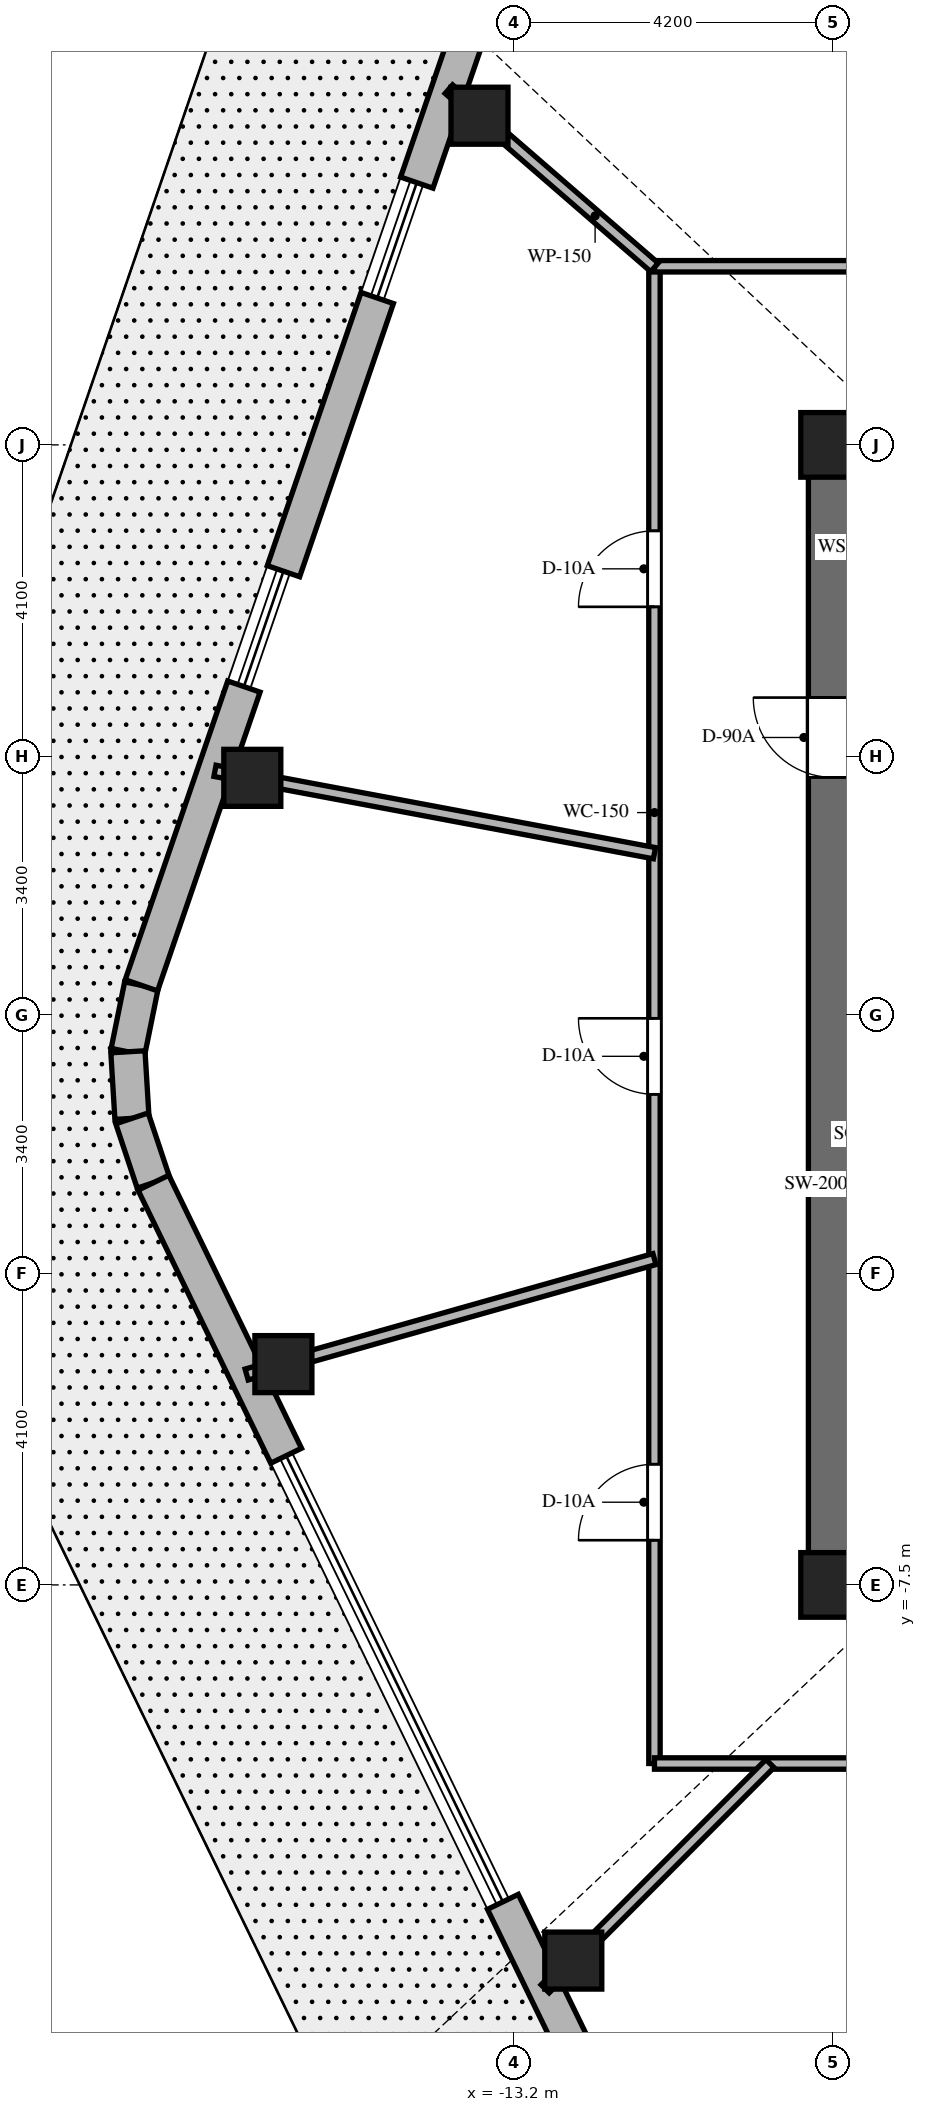
"""IFC4 building model, lengths in metres.
Left out: names, types, materials, properties, quantities, classifications, styles, units other than length and angle.
Written with IfcOpenShell. Run it as: python <this file> out.ifc"""

import sys

from ifc_helpers import new_model, si_unit, direction, frame, frame_2d, origin, origin_2d, place, context, subcontext, project, spatial, rectangle, extrude, element, fill, save


model = new_model("IFC4")
c1 = context("Model", 3, precision=1e-05, world=origin(), true_north=direction((0.0, 1.0)))
c2 = subcontext(c1, "Body", "Model", "MODEL_VIEW")
j1 = project(units=[si_unit("LENGTHUNIT", "METRE"), si_unit("PLANEANGLEUNIT", "RADIAN")], contexts=[c1])
p1 = place(None, origin())
s1 = spatial("IfcSite", under=j1, at=p1, CompositionType="ELEMENT")
p2 = place(p1, origin())
s2 = spatial("IfcBuilding", under=s1, at=p2, CompositionType="ELEMENT")
p3 = place(p2, frame((0.0, 0.0, 305.4)))
s3 = spatial("IfcBuildingStorey", under=s2, at=p3, CompositionType="ELEMENT", Elevation=305.4)
p4 = place(p3, frame((-9.325, -7.5, 0.0), z_axis=(0.0, 0.0, 1.0), x_axis=(1.0, 0.0, 0.0)))
e1 = element("IfcWall", 1, at=p4, inside=s3, PredefinedType="SHEAR", context=c2, shape_type="SweptSolid", body=[
    extrude(rectangle(XDim=18.65, YDim=0.65, at=frame_2d((9.325, 0.0))), origin(), (0.0, 0.0, 1.0), 5.0),
])
p5 = place(p4, frame((9.375, 0.0, 0.0)))
e2 = element("IfcOpeningElement", 2, at=p5, cuts=e1, PredefinedType="OPENING", context=c2, shape_type="SweptSolid", body=[
    extrude(rectangle(XDim=1.0, YDim=2.15, at=frame_2d((0.5, 1.075))), frame((0.0, 0.335, 0.0), z_axis=(0.0, -1.0, 0.0), x_axis=(1.0, 0.0, 0.0)), (0.0, 0.0, 1.0), 0.67),
])
p6 = place(p3, frame((-9.325, 7.5, 0.0), z_axis=(0.0, 0.0, 1.0), x_axis=(1.0, 0.0, 0.0)))
e3 = element("IfcWall", 3, at=p6, inside=s3, PredefinedType="SHEAR", context=c2, shape_type="SweptSolid", body=[
    extrude(rectangle(XDim=9.375, YDim=0.65, at=frame_2d((4.688, 0.0))), origin(), (0.0, 0.0, 1.0), 5.0),
])
p7 = place(p3, frame((-9.0, -7.175, 0.0), z_axis=(0.0, 0.0, 1.0), x_axis=(0.0, 1.0, 0.0)))
e4 = element("IfcWall", 4, at=p7, inside=s3, PredefinedType="SHEAR", context=c2, shape_type="SweptSolid", body=[
    extrude(rectangle(XDim=14.35, YDim=0.65, at=frame_2d((7.175, 0.0))), origin(), (0.0, 0.0, 1.0), 5.0),
])
p8 = place(p7, frame((10.3, 0.0, 0.0)))
e5 = element("IfcOpeningElement", 5, at=p8, cuts=e4, PredefinedType="OPENING", context=c2, shape_type="SweptSolid", body=[
    extrude(rectangle(XDim=1.05, YDim=2.15, at=frame_2d((0.525, 1.075))), frame((0.0, 0.335, 0.0), z_axis=(0.0, -1.0, 0.0), x_axis=(1.0, 0.0, 0.0)), (0.0, 0.0, 1.0), 0.67),
])
for number, where, z_axis, x_axis in (
    (6, (-9.0, -7.5, 0.0), (0.0, 0.0, 1.0), (1.0, 0.0, 0.0)),
    (7, (-9.0, 7.5, 0.0), (0.0, 0.0, 1.0), (1.0, 0.0, 0.0)),
):
    element("IfcColumn", number, at=place(p3, frame(where, z_axis=z_axis, x_axis=x_axis)), inside=s3, PredefinedType="COLUMN", context=c2, shape_type="SweptSolid", body=[
        extrude(rectangle(XDim=0.85, YDim=0.85, at=origin_2d()), origin(), (0.0, 0.0, 1.0), 5.0),
    ])
for number, where, z_axis, x_axis in (
    (8, (-13.652, 11.831, 0.0), (0.0, 0.0, 1.0), (1.0, 0.0, 0.0)),
    (9, (-16.641, 3.119, 0.0), (0.0, 0.0, 1.0), (1.0, 0.0, 0.0)),
    (10, (-16.232, -4.595, 0.0), (0.0, 0.0, 1.0), (1.0, 0.0, 0.0)),
    (11, (-12.418, -12.443, 0.0), (0.0, 0.0, 1.0), (1.0, 0.0, 0.0)),
):
    element("IfcColumn", number, at=place(p3, frame(where, z_axis=z_axis, x_axis=x_axis)), inside=s3, PredefinedType="COLUMN", context=c2, shape_type="SweptSolid", body=[
        extrude(rectangle(XDim=0.75, YDim=0.75, at=origin_2d()), origin(), (0.0, 0.0, 1.0), 5.0),
    ])
p9 = place(p3, frame((-18.1, 0.389, 0.0), z_axis=(0.0, 0.0, 1.0), x_axis=(-0.198587865476, -0.980083088154, 0.0)))
e12 = element("IfcWall", 12, at=p9, inside=s3, PredefinedType="SOLIDWALL", context=c2, shape_type="SweptSolid", body=[
    extrude(rectangle(XDim=0.893, YDim=0.45, at=frame_2d((0.446, 0.0))), origin(), (0.0, 0.0, 1.0), 4.68),
])
p10 = place(p3, frame((-18.278, -0.486, 0.0), z_axis=(0.0, 0.0, 1.0), x_axis=(0.060923410031, -0.998142443798, 0.0)))
e13 = element("IfcWall", 13, at=p10, inside=s3, PredefinedType="SOLIDWALL", context=c2, shape_type="SweptSolid", body=[
    extrude(rectangle(XDim=0.878, YDim=0.45, at=frame_2d((0.439, 0.0))), origin(), (0.0, 0.0, 1.0), 4.68),
])
p11 = place(p3, frame((-18.224, -1.362, 0.0), z_axis=(0.0, 0.0, 1.0), x_axis=(0.316227766017, -0.948683298051, 0.0)))
e14 = element("IfcWall", 14, at=p11, inside=s3, PredefinedType="SOLIDWALL", context=c2, shape_type="SweptSolid", body=[
    extrude(rectangle(XDim=0.893, YDim=0.45, at=frame_2d((0.446, 0.0))), origin(), (0.0, 0.0, 1.0), 4.68),
])
p12 = place(p3, frame((-13.131, 14.873, 0.0), z_axis=(0.0, 0.0, 1.0), x_axis=(-0.324498911717, -0.945886069405, 0.0)))
e15 = element("IfcWall", 15, at=p12, inside=s3, PredefinedType="SOLIDWALL", context=c2, shape_type="SweptSolid", body=[
    extrude(rectangle(XDim=4.147, YDim=0.45, at=frame_2d((2.073, 0.0))), origin(), (0.0, 0.0, 1.0), 4.68),
])
p13 = place(p3, frame((-14.998, 9.433, 0.0), z_axis=(0.0, 0.0, 1.0), x_axis=(-0.324503351443, -0.945884546286, 0.0)))
e16 = element("IfcWall", 16, at=p13, inside=s3, PredefinedType="SOLIDWALL", context=c2, shape_type="SweptSolid", body=[
    extrude(rectangle(XDim=3.8, YDim=0.45, at=frame_2d((1.9, 0.0))), origin(), (0.0, 0.0, 1.0), 4.68),
])
p14 = place(p3, frame((-16.752, 4.32, 0.0), z_axis=(0.0, 0.0, 1.0), x_axis=(-0.324516563827, -0.945880013428, 0.0)))
e17 = element("IfcWall", 17, at=p14, inside=s3, PredefinedType="SOLIDWALL", context=c2, shape_type="SweptSolid", body=[
    extrude(rectangle(XDim=4.156, YDim=0.45, at=frame_2d((2.078, 0.0))), origin(), (0.0, 0.0, 1.0), 4.68),
])
p15 = place(p3, frame((-17.942, -2.208, 0.0), z_axis=(0.0, 0.0, 1.0), x_axis=(0.437062225544, -0.899431270861, 0.0)))
e18 = element("IfcWall", 18, at=p15, inside=s3, PredefinedType="SOLIDWALL", context=c2, shape_type="SweptSolid", body=[
    extrude(rectangle(XDim=3.994, YDim=0.45, at=frame_2d((1.997, 0.0))), origin(), (0.0, 0.0, 1.0), 4.68),
])
p16 = place(p3, frame((-13.344, -11.67, 0.0), z_axis=(0.0, 0.0, 1.0), x_axis=(0.437044105444, -0.899440075768, 0.0)))
e19 = element("IfcWall", 19, at=p16, inside=s3, PredefinedType="SOLIDWALL", context=c2, shape_type="SweptSolid", body=[
    extrude(rectangle(XDim=3.987, YDim=0.45, at=frame_2d((1.993, 0.0))), origin(), (0.0, 0.0, 1.0), 4.68),
])
p17 = place(p3, frame((-11.35, -9.85, 0.0), z_axis=(0.0, 0.0, 1.0), x_axis=(0.0, 1.0, 0.0)))
e20 = element("IfcWall", 20, at=p17, inside=s3, PredefinedType="PARTITIONING", context=c2, shape_type="SweptSolid", body=[
    extrude(rectangle(XDim=19.7, YDim=0.15, at=frame_2d((9.85, 0.0))), origin(), (0.0, 0.0, 1.0), 2.87),
])
p18 = place(p17, frame((15.219, 0.0, 0.0)))
e21 = element("IfcOpeningElement", 21, at=p18, cuts=e20, PredefinedType="OPENING", context=c2, shape_type="SweptSolid", body=[
    extrude(rectangle(XDim=1.0, YDim=2.03, at=frame_2d((0.5, 1.015))), frame((0.0, 0.085, 0.0), z_axis=(0.0, -1.0, 0.0), x_axis=(1.0, 0.0, 0.0)), (0.0, 0.0, 1.0), 0.17),
])
p19 = place(p17, frame((8.805, 0.0, 0.0)))
e22 = element("IfcOpeningElement", 22, at=p19, cuts=e20, PredefinedType="OPENING", context=c2, shape_type="SweptSolid", body=[
    extrude(rectangle(XDim=1.0, YDim=2.03, at=frame_2d((0.5, 1.015))), frame((0.0, 0.085, 0.0), z_axis=(0.0, -1.0, 0.0), x_axis=(1.0, 0.0, 0.0)), (0.0, 0.0, 1.0), 0.17),
])
p20 = place(p17, frame((2.938, 0.0, 0.0)))
e23 = element("IfcOpeningElement", 23, at=p20, cuts=e20, PredefinedType="OPENING", context=c2, shape_type="SweptSolid", body=[
    extrude(rectangle(XDim=1.0, YDim=2.03, at=frame_2d((0.5, 1.015))), frame((0.0, 0.085, 0.0), z_axis=(0.0, -1.0, 0.0), x_axis=(1.0, 0.0, 0.0)), (0.0, 0.0, 1.0), 0.17),
])
p21 = place(p3, frame((-11.35, 9.85, 0.0), z_axis=(0.0, 0.0, 1.0), x_axis=(1.0, 0.0, 0.0)))
e24 = element("IfcWall", 24, at=p21, inside=s3, PredefinedType="PARTITIONING", context=c2, shape_type="SweptSolid", body=[
    extrude(rectangle(XDim=22.7, YDim=0.15, at=frame_2d((11.35, 0.0))), origin(), (0.0, 0.0, 1.0), 2.87),
])
p22 = place(p21, frame((17.249, 0.0, 0.0)))
e25 = element("IfcOpeningElement", 25, at=p22, cuts=e24, PredefinedType="OPENING", context=c2, shape_type="SweptSolid", body=[
    extrude(rectangle(XDim=1.0, YDim=2.03, at=frame_2d((0.5, 1.015))), frame((0.0, 0.085, 0.0), z_axis=(0.0, -1.0, 0.0), x_axis=(1.0, 0.0, 0.0)), (0.0, 0.0, 1.0), 0.17),
])
p23 = place(p21, frame((10.441, 0.0, 0.0)))
e26 = element("IfcOpeningElement", 26, at=p23, cuts=e24, PredefinedType="OPENING", context=c2, shape_type="SweptSolid", body=[
    extrude(rectangle(XDim=1.0, YDim=2.03, at=frame_2d((0.5, 1.015))), frame((0.0, 0.085, 0.0), z_axis=(0.0, -1.0, 0.0), x_axis=(1.0, 0.0, 0.0)), (0.0, 0.0, 1.0), 0.17),
])
p24 = place(p21, frame((3.454, 0.0, 0.0)))
e27 = element("IfcOpeningElement", 27, at=p24, cuts=e24, PredefinedType="OPENING", context=c2, shape_type="SweptSolid", body=[
    extrude(rectangle(XDim=1.0, YDim=2.03, at=frame_2d((0.5, 1.015))), frame((0.0, 0.085, 0.0), z_axis=(0.0, -1.0, 0.0), x_axis=(1.0, 0.0, 0.0)), (0.0, 0.0, 1.0), 0.17),
])
p25 = place(p3, frame((11.35, -9.85, 0.0), z_axis=(0.0, 0.0, 1.0), x_axis=(-1.0, 0.0, 0.0)))
e28 = element("IfcWall", 28, at=p25, inside=s3, PredefinedType="PARTITIONING", context=c2, shape_type="SweptSolid", body=[
    extrude(rectangle(XDim=22.7, YDim=0.15, at=frame_2d((11.35, 0.0))), origin(), (0.0, 0.0, 1.0), 2.87),
])
p26 = place(p25, frame((17.249, 0.0, 0.0)))
e29 = element("IfcOpeningElement", 29, at=p26, cuts=e28, PredefinedType="OPENING", context=c2, shape_type="SweptSolid", body=[
    extrude(rectangle(XDim=1.0, YDim=2.03, at=frame_2d((0.5, 1.015))), frame((0.0, 0.085, 0.0), z_axis=(0.0, -1.0, 0.0), x_axis=(1.0, 0.0, 0.0)), (0.0, 0.0, 1.0), 0.17),
])
p27 = place(p25, frame((10.441, 0.0, 0.0)))
e30 = element("IfcOpeningElement", 30, at=p27, cuts=e28, PredefinedType="OPENING", context=c2, shape_type="SweptSolid", body=[
    extrude(rectangle(XDim=1.0, YDim=2.03, at=frame_2d((0.5, 1.015))), frame((0.0, 0.085, 0.0), z_axis=(0.0, -1.0, 0.0), x_axis=(1.0, 0.0, 0.0)), (0.0, 0.0, 1.0), 0.17),
])
p28 = place(p25, frame((3.454, 0.0, 0.0)))
e31 = element("IfcOpeningElement", 31, at=p28, cuts=e28, PredefinedType="OPENING", context=c2, shape_type="SweptSolid", body=[
    extrude(rectangle(XDim=1.0, YDim=2.03, at=frame_2d((0.5, 1.015))), frame((0.0, 0.085, 0.0), z_axis=(0.0, -1.0, 0.0), x_axis=(1.0, 0.0, 0.0)), (0.0, 0.0, 1.0), 0.17),
])
p29 = place(p3, frame((-11.35, 9.836, 0.0), z_axis=(0.0, 0.0, 1.0), x_axis=(-0.755716089778, 0.65489937521, 0.0)))
e32 = element("IfcWall", 32, at=p29, inside=s3, PredefinedType="PARTITIONING", context=c2, shape_type="SweptSolid", body=[
    extrude(rectangle(XDim=3.579, YDim=0.15, at=frame_2d((1.79, 0.0))), origin(), (0.0, 0.0, 1.0), 2.87),
])
p30 = place(p3, frame((-11.35, 2.127, 0.0), z_axis=(0.0, 0.0, 1.0), x_axis=(-0.982876415115, 0.184265983326, 0.0)))
e33 = element("IfcWall", 33, at=p30, inside=s3, PredefinedType="PARTITIONING", context=c2, shape_type="SweptSolid", body=[
    extrude(rectangle(XDim=5.883, YDim=0.15, at=frame_2d((2.941, 0.0))), origin(), (0.0, 0.0, 1.0), 2.87),
])
p31 = place(p3, frame((-11.35, -3.213, 0.0), z_axis=(0.0, 0.0, 1.0), x_axis=(-0.962182015747, -0.272407357782, 0.0)))
e34 = element("IfcWall", 34, at=p31, inside=s3, PredefinedType="PARTITIONING", context=c2, shape_type="SweptSolid", body=[
    extrude(rectangle(XDim=5.576, YDim=0.15, at=frame_2d((2.788, 0.0))), origin(), (0.0, 0.0, 1.0), 2.87),
])
p32 = place(p3, frame((-9.83, -9.85, 0.0), z_axis=(0.0, 0.0, 1.0), x_axis=(-0.706435999186, -0.707776927467, 0.0)))
e35 = element("IfcWall", 35, at=p32, inside=s3, PredefinedType="PARTITIONING", context=c2, shape_type="SweptSolid", body=[
    extrude(rectangle(XDim=4.188, YDim=0.15, at=frame_2d((2.094, 0.0))), origin(), (0.0, 0.0, 1.0), 2.87),
])
p33 = place(p8, origin())
e36 = element("IfcDoor", 36, at=p33, inside=s3, OperationType="SINGLE_SWING_RIGHT", PredefinedType="DOOR", context=c2, shape_type="SweptSolid", body=[
    extrude(rectangle(XDim=1.05, YDim=2.15, at=frame_2d((0.525, 1.075))), frame((0.0, 0.025, 0.0), z_axis=(0.0, -1.0, 0.0), x_axis=(1.0, 0.0, 0.0)), (0.0, 0.0, 1.0), 0.05),
])
fill(e5, e36)
p34 = place(p18, origin())
e37 = element("IfcDoor", 37, at=p34, inside=s3, OperationType="SINGLE_SWING_LEFT", PredefinedType="DOOR", context=c2, shape_type="SweptSolid", body=[
    extrude(rectangle(XDim=1.0, YDim=2.03, at=frame_2d((0.5, 1.015))), frame((0.0, 0.025, 0.0), z_axis=(0.0, -1.0, 0.0), x_axis=(1.0, 0.0, 0.0)), (0.0, 0.0, 1.0), 0.05),
])
fill(e21, e37)
p35 = place(p19, origin())
e38 = element("IfcDoor", 38, at=p35, inside=s3, OperationType="SINGLE_SWING_RIGHT", PredefinedType="DOOR", context=c2, shape_type="SweptSolid", body=[
    extrude(rectangle(XDim=1.0, YDim=2.03, at=frame_2d((0.5, 1.015))), frame((0.0, 0.025, 0.0), z_axis=(0.0, -1.0, 0.0), x_axis=(1.0, 0.0, 0.0)), (0.0, 0.0, 1.0), 0.05),
])
fill(e22, e38)
p36 = place(p20, origin())
e39 = element("IfcDoor", 39, at=p36, inside=s3, OperationType="SINGLE_SWING_LEFT", PredefinedType="DOOR", context=c2, shape_type="SweptSolid", body=[
    extrude(rectangle(XDim=1.0, YDim=2.03, at=frame_2d((0.5, 1.015))), frame((0.0, 0.025, 0.0), z_axis=(0.0, -1.0, 0.0), x_axis=(1.0, 0.0, 0.0)), (0.0, 0.0, 1.0), 0.05),
])
fill(e23, e39)
save(model, sys.argv[1])
